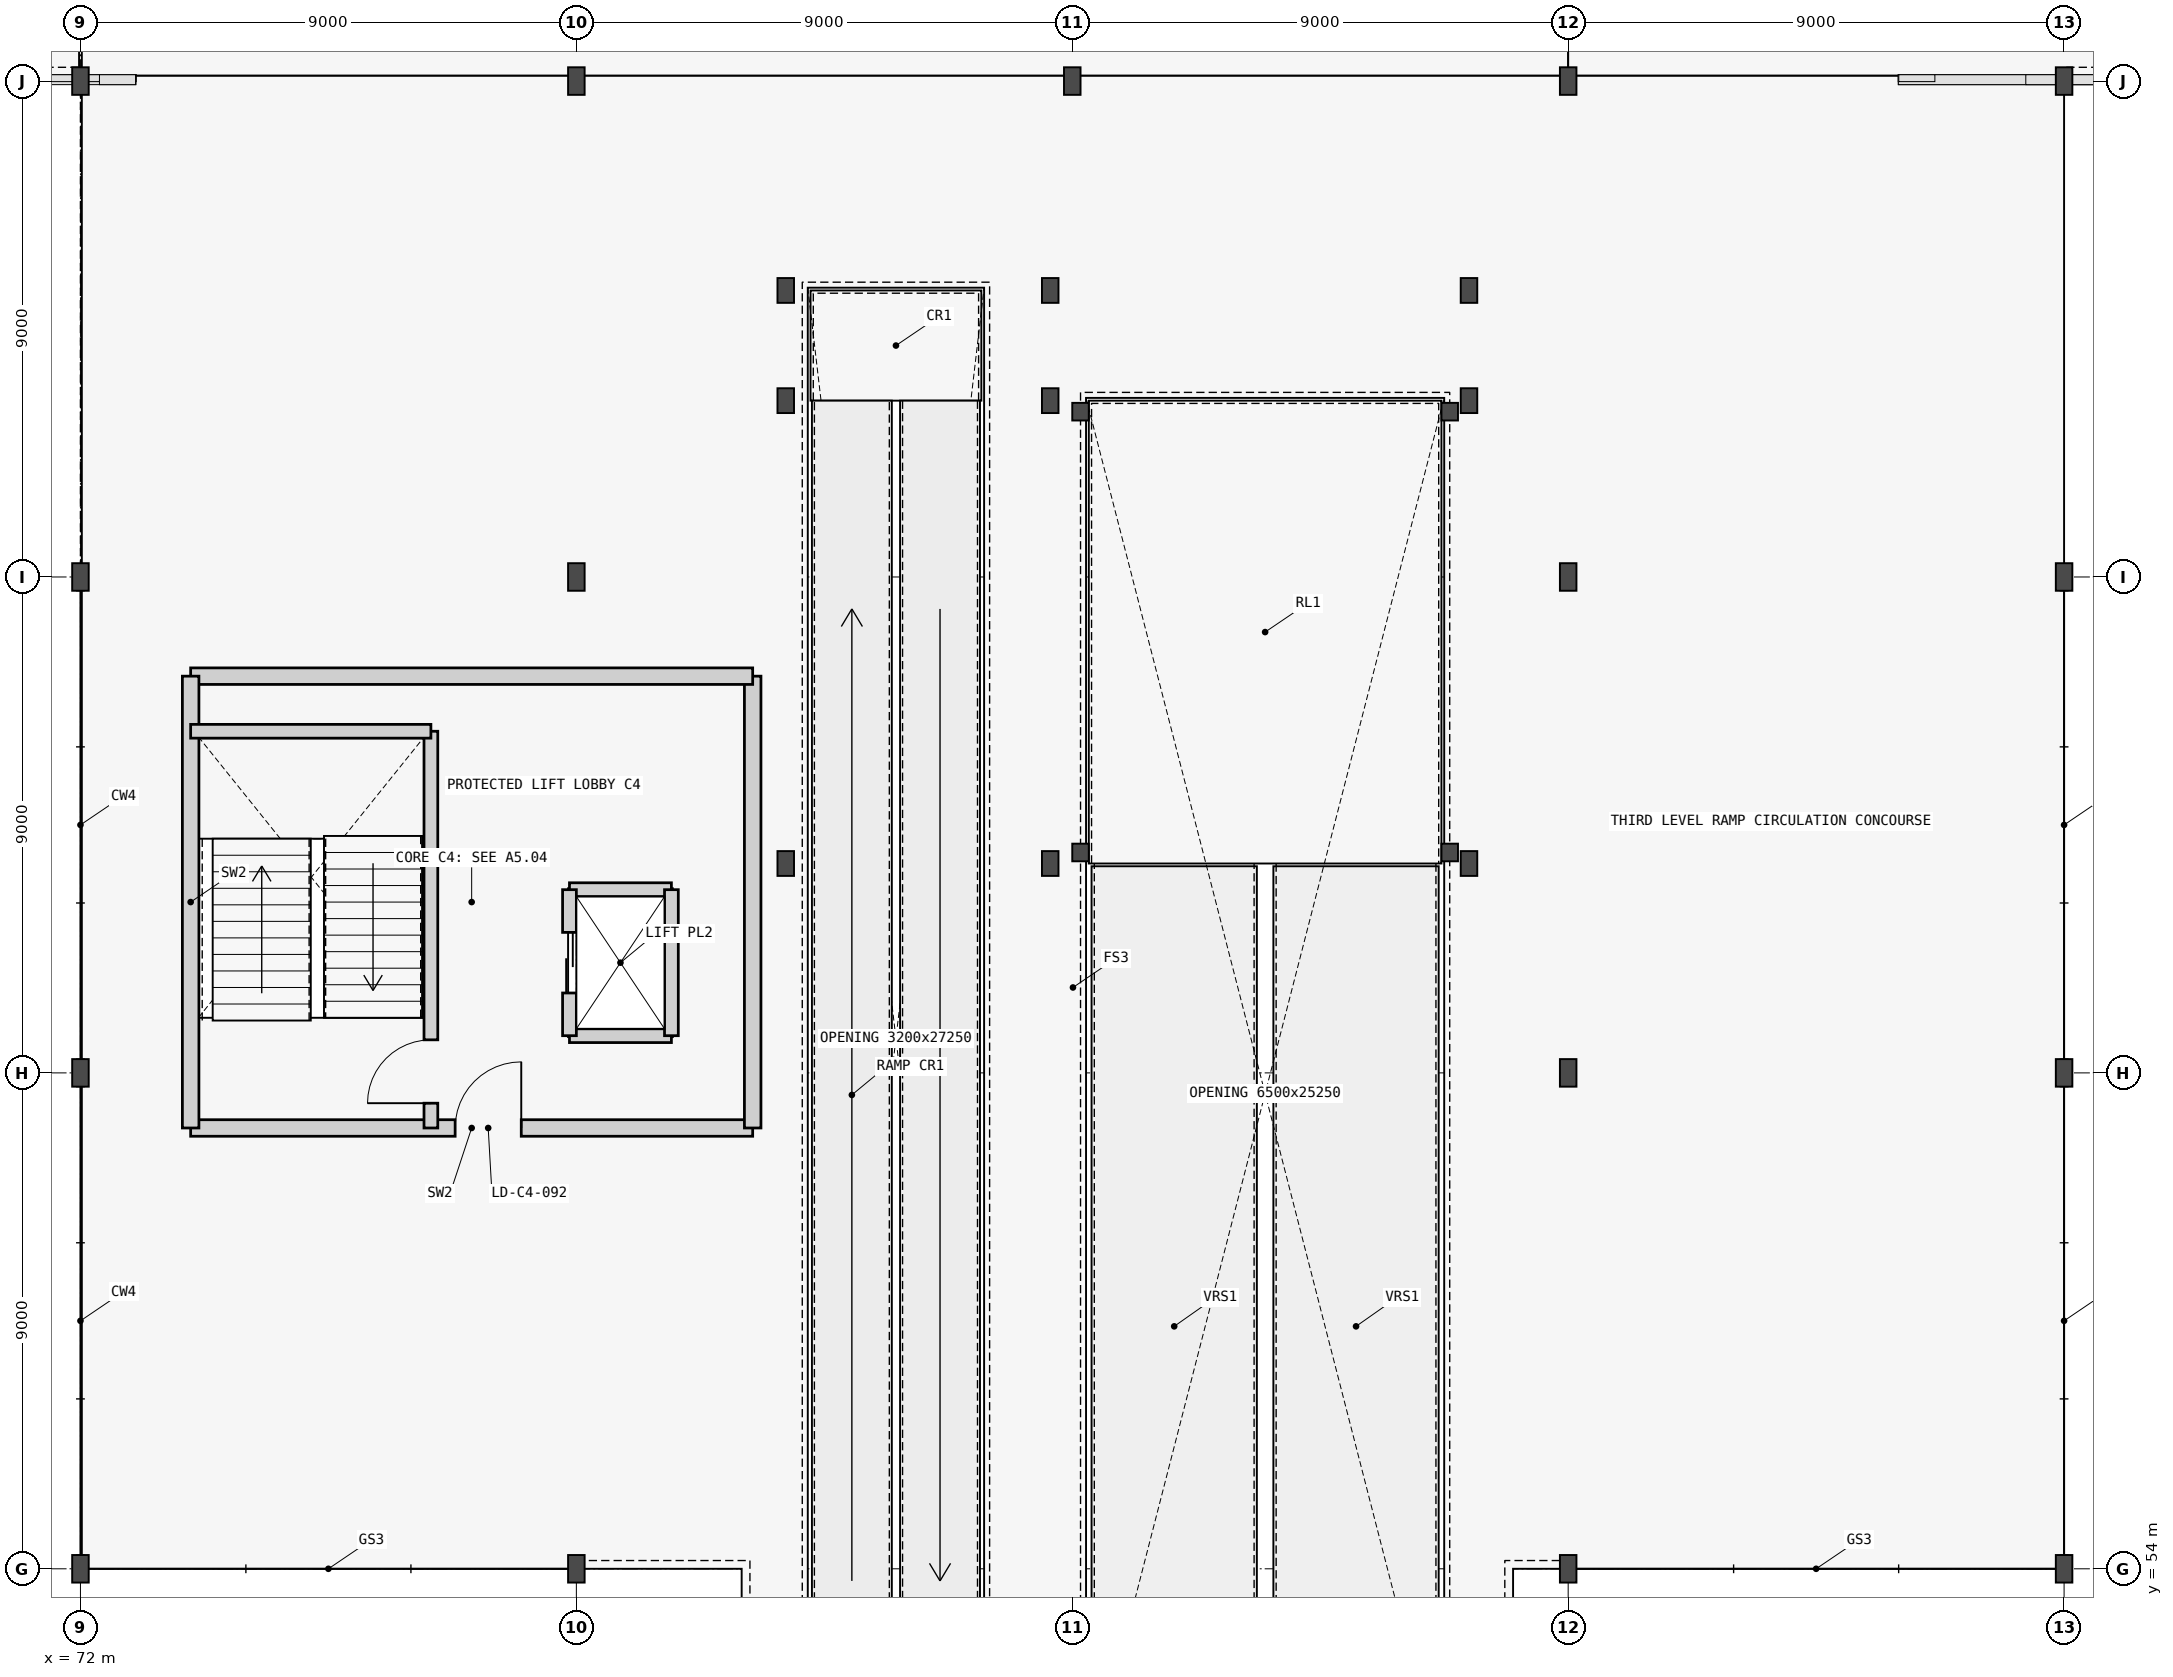
"""IFC4 building model, lengths in metres.
Left out: names, types, materials, properties, quantities, classifications, styles, units other than length and angle.
Written with IfcOpenShell. Run it as: python <this file> out.ifc"""

import sys

from ifc_helpers import new_model, si_unit, direction, frame, frame_2d, origin, origin_2d, place, context, subcontext, project, spatial, rectangle, i_section, extrude, element, fill, save


model = new_model("IFC4")
c1 = context("Model", 3, precision=1e-05, world=origin(), true_north=direction((0.0, 1.0)))
c2 = subcontext(c1, "Body", "Model", "MODEL_VIEW")
j1 = project(units=[si_unit("LENGTHUNIT", "METRE"), si_unit("PLANEANGLEUNIT", "RADIAN")], contexts=[c1])
p1 = place(None, origin())
s1 = spatial("IfcSite", under=j1, at=p1, CompositionType="ELEMENT")
p2 = place(p1, origin())
s2 = spatial("IfcBuilding", under=s1, at=p2, CompositionType="ELEMENT")
p3 = place(p2, frame((0.0, 0.0, 12.6)))
s3 = spatial("IfcBuildingStorey", under=s2, at=p3, CompositionType="ELEMENT", Elevation=12.6)
for number, where, z_axis, x_axis in (
    (1, (72.0, 54.0, 0.0), (0.0, 0.0, 1.0), (1.0, 0.0, 0.0)),
    (2, (72.0, 63.0, 0.0), (0.0, 0.0, 1.0), (1.0, 0.0, 0.0)),
    (3, (72.0, 72.0, 0.0), (0.0, 0.0, 1.0), (1.0, 0.0, 0.0)),
    (4, (72.0, 81.0, 0.0), (0.0, 0.0, 1.0), (1.0, 0.0, 0.0)),
    (5, (81.0, 54.0, 0.0), (0.0, 0.0, 1.0), (1.0, 0.0, 0.0)),
    (6, (81.0, 72.0, 0.0), (0.0, 0.0, 1.0), (1.0, 0.0, 0.0)),
    (7, (81.0, 81.0, 0.0), (0.0, 0.0, 1.0), (1.0, 0.0, 0.0)),
    (8, (99.0, 54.0, 0.0), (0.0, 0.0, 1.0), (1.0, 0.0, 0.0)),
    (9, (99.0, 63.0, 0.0), (0.0, 0.0, 1.0), (1.0, 0.0, 0.0)),
    (10, (99.0, 72.0, 0.0), (0.0, 0.0, 1.0), (1.0, 0.0, 0.0)),
    (11, (99.0, 81.0, 0.0), (0.0, 0.0, 1.0), (1.0, 0.0, 0.0)),
    (12, (108.0, 54.0, 0.0), (0.0, 0.0, 1.0), (1.0, 0.0, 0.0)),
    (13, (108.0, 63.0, 0.0), (0.0, 0.0, 1.0), (1.0, 0.0, 0.0)),
    (14, (108.0, 72.0, 0.0), (0.0, 0.0, 1.0), (1.0, 0.0, 0.0)),
    (15, (108.0, 81.0, 0.0), (0.0, 0.0, 1.0), (1.0, 0.0, 0.0)),
):
    element("IfcColumn", number, at=place(p3, frame(where, z_axis=z_axis, x_axis=x_axis)), inside=s3, PredefinedType="COLUMN", context=c2, shape_type="SweptSolid", body=[
        extrude(i_section(OverallWidth=0.3, OverallDepth=0.5, WebThickness=0.014, FlangeThickness=0.028, FilletRadius=0.027, at=origin_2d()), origin(), (0.0, 0.0, 1.0), 4.2),
    ])
for number, where, z_axis, x_axis in (
    (16, (84.8, 66.8, 0.0), (0.0, 0.0, 1.0), (1.0, 0.0, 0.0)),
    (17, (84.8, 75.2, 0.0), (0.0, 0.0, 1.0), (1.0, 0.0, 0.0)),
    (18, (84.8, 77.2, 0.0), (0.0, 0.0, 1.0), (1.0, 0.0, 0.0)),
    (19, (89.6, 66.8, 0.0), (0.0, 0.0, 1.0), (1.0, 0.0, 0.0)),
    (20, (89.6, 75.2, 0.0), (0.0, 0.0, 1.0), (1.0, 0.0, 0.0)),
    (21, (89.6, 77.2, 0.0), (0.0, 0.0, 1.0), (1.0, 0.0, 0.0)),
    (22, (97.2, 66.8, 0.0), (0.0, 0.0, 1.0), (1.0, 0.0, 0.0)),
    (23, (97.2, 75.2, 0.0), (0.0, 0.0, 1.0), (1.0, 0.0, 0.0)),
    (24, (97.2, 77.2, 0.0), (0.0, 0.0, 1.0), (1.0, 0.0, 0.0)),
):
    element("IfcColumn", number, at=place(p3, frame(where, z_axis=z_axis, x_axis=x_axis)), inside=s3, PredefinedType="COLUMN", context=c2, shape_type="SweptSolid", body=[
        extrude(i_section(OverallWidth=0.3, OverallDepth=0.45, WebThickness=0.014, FlangeThickness=0.026, FilletRadius=0.027, at=origin_2d()), origin(), (0.0, 0.0, 1.0), 4.2),
    ])
p4 = place(p3, frame((90.0, 81.0, 0.0), z_axis=(0.0, 0.0, 1.0), x_axis=(1.0, 0.0, 0.0)))
e25 = element("IfcColumn", 25, at=p4, inside=s3, PredefinedType="COLUMN", context=c2, shape_type="SweptSolid", body=[
    extrude(i_section(OverallWidth=0.3, OverallDepth=0.5, WebThickness=0.014, FlangeThickness=0.028, FilletRadius=0.027, at=origin_2d()), origin(), (0.0, 0.0, 1.0), 4.2),
])
for number, where, z_axis, x_axis in (
    (26, (90.15, 67.0, 0.0), (0.0, 0.0, 1.0), (1.0, 0.0, 0.0)),
    (27, (90.15, 75.0, 0.0), (0.0, 0.0, 1.0), (1.0, 0.0, 0.0)),
    (28, (96.85, 67.0, 0.0), (0.0, 0.0, 1.0), (1.0, 0.0, 0.0)),
    (29, (96.85, 75.0, 0.0), (0.0, 0.0, 1.0), (1.0, 0.0, 0.0)),
):
    element("IfcColumn", number, at=place(p3, frame(where, z_axis=z_axis, x_axis=x_axis)), inside=s3, PredefinedType="COLUMN", context=c2, shape_type="SweptSolid", body=[
        extrude(i_section(OverallWidth=0.3, OverallDepth=0.32, WebThickness=0.011, FlangeThickness=0.021, FilletRadius=0.027, at=origin_2d()), origin(), (0.0, 0.0, 1.0), 4.2),
    ])
p5 = place(p3, frame((74.0, 62.0, 0.0), z_axis=(0.0, 0.0, 1.0), x_axis=(1.0, 0.0, 0.0)))
e30 = element("IfcWall", 30, at=p5, inside=s3, PredefinedType="SHEAR", context=c2, shape_type="SweptSolid", body=[
    extrude(rectangle(XDim=10.2, YDim=0.3, at=frame_2d((5.1, 0.0))), origin(), (0.0, 0.0, 1.0), 3.925),
])
p6 = place(p5, frame((4.8, 0.0, 0.0)))
e31 = element("IfcOpeningElement", 31, at=p6, cuts=e30, PredefinedType="OPENING", context=c2, shape_type="SweptSolid", body=[
    extrude(rectangle(XDim=1.2, YDim=2.15, at=frame_2d((0.6, 1.075))), frame((0.0, 0.16, 0.0), z_axis=(0.0, -1.0, 0.0), x_axis=(1.0, 0.0, 0.0)), (0.0, 0.0, 1.0), 0.32),
])
p7 = place(p3, frame((84.2, 62.0, 0.0), z_axis=(0.0, 0.0, 1.0), x_axis=(0.0, 1.0, 0.0)))
e32 = element("IfcWall", 32, at=p7, inside=s3, PredefinedType="SHEAR", context=c2, shape_type="SweptSolid", body=[
    extrude(rectangle(XDim=8.2, YDim=0.3, at=frame_2d((4.1, 0.0))), origin(), (0.0, 0.0, 1.0), 3.925),
])
p8 = place(p3, frame((84.2, 70.2, 0.0), z_axis=(0.0, 0.0, 1.0), x_axis=(-1.0, 0.0, 0.0)))
e33 = element("IfcWall", 33, at=p8, inside=s3, PredefinedType="SHEAR", context=c2, shape_type="SweptSolid", body=[
    extrude(rectangle(XDim=10.2, YDim=0.3, at=frame_2d((5.1, 0.0))), origin(), (0.0, 0.0, 1.0), 3.925),
])
p9 = place(p3, frame((74.0, 70.2, 0.0), z_axis=(0.0, 0.0, 1.0), x_axis=(0.0, -1.0, 0.0)))
e34 = element("IfcWall", 34, at=p9, inside=s3, PredefinedType="SHEAR", context=c2, shape_type="SweptSolid", body=[
    extrude(rectangle(XDim=8.2, YDim=0.3, at=frame_2d((4.1, 0.0))), origin(), (0.0, 0.0, 1.0), 3.925),
])
p10 = place(p3, frame((78.36, 62.0, 0.0), z_axis=(0.0, 0.0, 1.0), x_axis=(0.0, 1.0, 0.0)))
e35 = element("IfcWall", 35, at=p10, inside=s3, PredefinedType="SHEAR", context=c2, shape_type="SweptSolid", body=[
    extrude(rectangle(XDim=7.2, YDim=0.25, at=frame_2d((3.6, 0.0))), origin(), (0.0, 0.0, 1.0), 3.925),
])
p11 = place(p10, frame((0.45, 0.0, 0.0)))
e36 = element("IfcOpeningElement", 36, at=p11, cuts=e35, PredefinedType="OPENING", context=c2, shape_type="SweptSolid", body=[
    extrude(rectangle(XDim=1.15, YDim=2.15, at=frame_2d((0.575, 1.075))), frame((0.0, 0.135, 0.0), z_axis=(0.0, -1.0, 0.0), x_axis=(1.0, 0.0, 0.0)), (0.0, 0.0, 1.0), 0.27),
])
p12 = place(p3, frame((74.0, 69.2, 0.0), z_axis=(0.0, 0.0, 1.0), x_axis=(1.0, 0.0, 0.0)))
e37 = element("IfcWall", 37, at=p12, inside=s3, PredefinedType="SHEAR", context=c2, shape_type="SweptSolid", body=[
    extrude(rectangle(XDim=4.36, YDim=0.25, at=frame_2d((2.18, 0.0))), origin(), (0.0, 0.0, 1.0), 3.925),
])
for number, where, z_axis, x_axis in (
    (38, (80.875, 63.675, 0.0), (0.0, 0.0, 1.0), (1.0, 0.0, 0.0)),
    (39, (80.875, 66.325, 0.0), (0.0, 0.0, 1.0), (1.0, 0.0, 0.0)),
):
    element("IfcWall", number, at=place(p3, frame(where, z_axis=z_axis, x_axis=x_axis)), inside=s3, PredefinedType="SHEAR", context=c2, shape_type="SweptSolid", body=[
        extrude(rectangle(XDim=1.85, YDim=0.25, at=frame_2d((0.925, 0.0))), origin(), (0.0, 0.0, 1.0), 3.925),
    ])
p13 = place(p3, frame((82.725, 63.675, 0.0), z_axis=(0.0, 0.0, 1.0), x_axis=(0.0, 1.0, 0.0)))
e40 = element("IfcWall", 40, at=p13, inside=s3, PredefinedType="SHEAR", context=c2, shape_type="SweptSolid", body=[
    extrude(rectangle(XDim=2.65, YDim=0.25, at=frame_2d((1.325, 0.0))), origin(), (0.0, 0.0, 1.0), 3.925),
])
p14 = place(p3, frame((80.875, 63.675, 0.0), z_axis=(0.0, 0.0, 1.0), x_axis=(0.0, 1.0, 0.0)))
e41 = element("IfcWall", 41, at=p14, inside=s3, PredefinedType="SHEAR", context=c2, shape_type="SweptSolid", body=[
    extrude(rectangle(XDim=2.65, YDim=0.25, at=frame_2d((1.325, 0.0))), origin(), (0.0, 0.0, 1.0), 3.925),
])
p15 = place(p14, frame((0.775, 0.0, 0.0)))
e42 = element("IfcOpeningElement", 42, at=p15, cuts=e41, PredefinedType="OPENING", context=c2, shape_type="SweptSolid", body=[
    extrude(rectangle(XDim=1.1, YDim=2.15, at=frame_2d((0.55, 1.075))), frame((0.0, 0.135, 0.0), z_axis=(0.0, -1.0, 0.0), x_axis=(1.0, 0.0, 0.0)), (0.0, 0.0, 1.0), 0.27),
])
p16 = place(p11, origin())
e43 = element("IfcDoor", 43, at=p16, inside=s3, OperationType="SINGLE_SWING_LEFT", PredefinedType="DOOR", context=c2, shape_type="SweptSolid", body=[
    extrude(rectangle(XDim=1.15, YDim=2.15, at=frame_2d((0.575, 1.075))), frame((0.0, 0.025, 0.0), z_axis=(0.0, -1.0, 0.0), x_axis=(1.0, 0.0, 0.0)), (0.0, 0.0, 1.0), 0.05),
])
fill(e36, e43)
p17 = place(p6, origin())
e44 = element("IfcDoor", 44, at=p17, inside=s3, OperationType="SINGLE_SWING_RIGHT", PredefinedType="DOOR", context=c2, shape_type="SweptSolid", body=[
    extrude(rectangle(XDim=1.2, YDim=2.15, at=frame_2d((0.6, 1.075))), frame((0.0, 0.025, 0.0), z_axis=(0.0, -1.0, 0.0), x_axis=(1.0, 0.0, 0.0)), (0.0, 0.0, 1.0), 0.05),
])
fill(e31, e44)
p18 = place(p15, origin())
e45 = element("IfcDoor", 45, at=p18, inside=s3, OperationType="DOUBLE_DOOR_SLIDING", PredefinedType="USERDEFINED", context=c2, shape_type="SweptSolid", body=[
    extrude(rectangle(XDim=1.1, YDim=2.15, at=frame_2d((0.55, 1.075))), frame((0.0, 0.025, 0.0), z_axis=(0.0, -1.0, 0.0), x_axis=(1.0, 0.0, 0.0)), (0.0, 0.0, 1.0), 0.05),
])
fill(e42, e45)
save(model, sys.argv[1])
